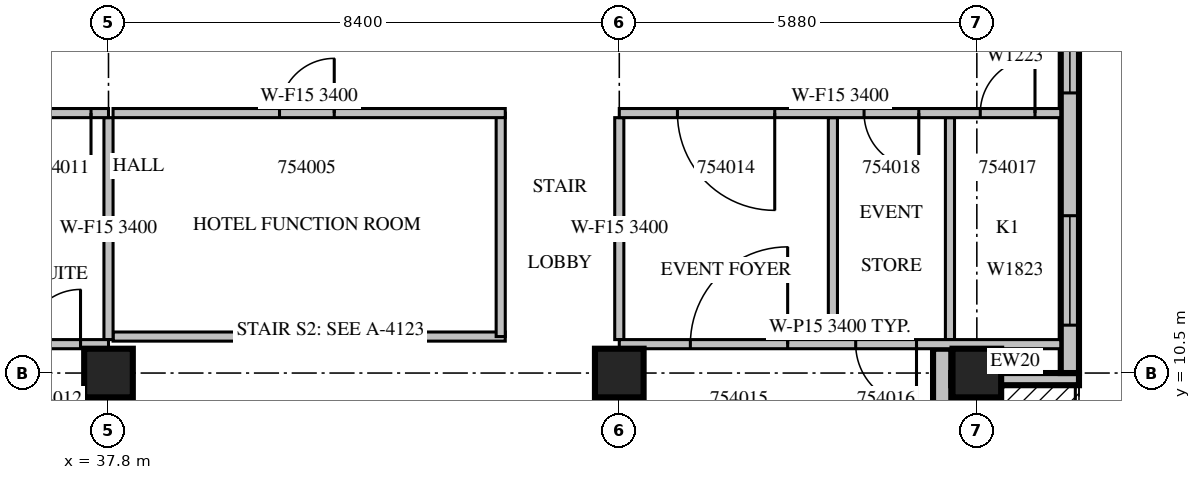
"""IFC4 building model, lengths in metres.
Left out: names, types, materials, properties, quantities, classifications, styles, units other than length and angle.
Written with IfcOpenShell. Run it as: python <this file> out.ifc"""

import sys

from ifc_helpers import new_model, si_unit, direction, frame, frame_2d, origin, origin_2d, place, context, subcontext, project, spatial, rectangle, extrude, source, transform, mapped, element, fill, save


model = new_model("IFC4")
c1 = context("Model", 3, precision=1e-05, world=origin(), true_north=direction((0.0, 1.0)))
c2 = subcontext(c1, "Body", "Model", "MODEL_VIEW")
j1 = project(units=[si_unit("LENGTHUNIT", "METRE"), si_unit("PLANEANGLEUNIT", "RADIAN")], contexts=[c1])
p1 = place(None, origin())
s1 = spatial("IfcSite", under=j1, at=p1, CompositionType="ELEMENT")
p2 = place(p1, origin())
s2 = spatial("IfcBuilding", under=s1, at=p2, CompositionType="ELEMENT")
p3 = place(p2, frame((0.0, 0.0, 238.6)))
s3 = spatial("IfcBuildingStorey", under=s2, at=p3, CompositionType="ELEMENT", Elevation=238.6)
m1 = source(origin(), c2, "Body", "SweptSolid", [
    extrude(rectangle(XDim=0.8, YDim=0.8, at=origin_2d()), origin(), (0.0, 0.0, 1.0), 3.8),
])
for number, where, z_axis, x_axis in (
    (1, (37.8, 10.5, 0.0), (0.0, 0.0, 1.0), (1.0, 0.0, 0.0)),
    (2, (46.2, 10.5, 0.0), (0.0, 0.0, 1.0), (1.0, 0.0, 0.0)),
    (3, (52.08, 10.5, 0.0), (0.0, 0.0, 1.0), (1.0, 0.0, 0.0)),
):
    element("IfcColumn", number, at=place(p3, frame(where, z_axis=z_axis, x_axis=x_axis)), inside=s3, PredefinedType="COLUMN", context=c2, shape_type="MappedRepresentation", body=[
        mapped(m1, transform((0.0, 0.0, 0.0), scale=1.0)),
    ])
m2 = source(origin(), c2, "Body", "SweptSolid", [
    extrude(rectangle(XDim=3.55, YDim=0.3, at=frame_2d((1.775, 0.0))), origin(), (0.0, 0.0, 1.0), 3.4),
])
p4 = place(p3, frame((51.51, 7.35, 0.0), z_axis=(0.0, 0.0, 1.0), x_axis=(0.0, 1.0, 0.0)))
e4 = element("IfcWall", 4, at=p4, inside=s3, PredefinedType="STANDARD", context=c2, shape_type="MappedRepresentation", body=[
    mapped(m2, transform((0.0, 0.0, 0.0), scale=1.0)),
])
m3 = source(origin(), c2, "Body", "SweptSolid", [
    extrude(rectangle(XDim=1.8, YDim=2.4, at=frame_2d((0.9, 1.2))), frame((0.0, 0.16, 0.0), z_axis=(0.0, -1.0, 0.0), x_axis=(1.0, 0.0, 0.0)), (0.0, 0.0, 1.0), 0.32),
])
p5 = place(p4, frame((0.675, 0.0, 0.0)))
e5 = element("IfcOpeningElement", 5, at=p5, cuts=e4, PredefinedType="OPENING", context=c2, shape_type="MappedRepresentation", body=[
    mapped(m3, transform((0.0, 0.0, 0.0), scale=1.0)),
])
m4 = source(origin(), c2, "Body", "SweptSolid", [
    extrude(rectangle(XDim=2.1, YDim=0.2, at=frame_2d((1.05, 0.0))), origin(), (0.0, 0.0, 1.0), 3.4),
])
p6 = place(p3, frame((53.76, 10.4, 0.0), z_axis=(0.0, 0.0, 1.0), x_axis=(-1.0, 0.0, 0.0)))
e6 = element("IfcWall", 6, at=p6, inside=s3, PredefinedType="STANDARD", context=c2, shape_type="MappedRepresentation", body=[
    mapped(m4, transform((0.0, 0.0, 0.0), scale=1.0)),
])
m5 = source(origin(), c2, "Body", "SweptSolid", [
    extrude(rectangle(XDim=6.75, YDim=0.3, at=frame_2d((3.375, 0.0))), origin(), (0.0, 0.0, 1.0), 3.4),
])
p7 = place(p3, frame((53.61, 10.5, 0.0), z_axis=(0.0, 0.0, 1.0), x_axis=(0.0, 1.0, 0.0)))
e7 = element("IfcWall", 7, at=p7, inside=s3, PredefinedType="STANDARD", context=c2, shape_type="MappedRepresentation", body=[
    mapped(m5, transform((0.0, 0.0, 0.0), scale=1.0)),
])
m6 = source(origin(), c2, "Body", "SweptSolid", [
    extrude(rectangle(XDim=1.8, YDim=2.3, at=frame_2d((0.9, 1.15))), frame((0.0, 0.16, 0.0), z_axis=(0.0, -1.0, 0.0), x_axis=(1.0, 0.0, 0.0)), (0.0, 0.0, 1.0), 0.32),
])
p8 = place(p7, frame((0.787, 0.0, 0.6)))
e8 = element("IfcOpeningElement", 8, at=p8, cuts=e7, PredefinedType="OPENING", context=c2, shape_type="MappedRepresentation", body=[
    mapped(m6, transform((0.0, 0.0, 0.0), scale=1.0)),
])
m7 = source(origin(), c2, "Body", "SweptSolid", [
    extrude(rectangle(XDim=1.2, YDim=2.3, at=frame_2d((0.6, 1.15))), frame((0.0, 0.16, 0.0), z_axis=(0.0, -1.0, 0.0), x_axis=(1.0, 0.0, 0.0)), (0.0, 0.0, 1.0), 0.32),
])
p9 = place(p7, frame((4.606, 0.0, 0.6)))
e9 = element("IfcOpeningElement", 9, at=p9, cuts=e7, PredefinedType="OPENING", context=c2, shape_type="MappedRepresentation", body=[
    mapped(m7, transform((0.0, 0.0, 0.0), scale=1.0)),
])
m8 = source(origin(), c2, "Body", "SweptSolid", [
    extrude(rectangle(XDim=6.45, YDim=0.15, at=frame_2d((3.225, 0.0))), origin(), (0.0, 0.0, 1.0), 3.4),
])
p10 = place(p3, frame((37.875, 11.1, 0.0), z_axis=(0.0, 0.0, 1.0), x_axis=(1.0, 0.0, 0.0)))
e10 = element("IfcWall", 10, at=p10, inside=s3, PredefinedType="PARTITIONING", context=c2, shape_type="MappedRepresentation", body=[
    mapped(m8, transform((0.0, 0.0, 0.0), scale=1.0)),
])
p11 = place(p3, frame((44.25, 11.1, 0.0), z_axis=(0.0, 0.0, 1.0), x_axis=(0.0, 1.0, 0.0)))
e11 = element("IfcWall", 11, at=p11, inside=s3, PredefinedType="PARTITIONING", context=c2, shape_type="SweptSolid", body=[
    extrude(rectangle(XDim=3.675, YDim=0.15, at=frame_2d((1.837, 0.0))), origin(), (0.0, 0.0, 1.0), 3.4),
])
p12 = place(p3, frame((44.325, 14.775, 0.0), z_axis=(0.0, 0.0, 1.0), x_axis=(-1.0, 0.0, 0.0)))
e12 = element("IfcWall", 12, at=p12, inside=s3, PredefinedType="PARTITIONING", context=c2, shape_type="MappedRepresentation", body=[
    mapped(m8, transform((0.0, 0.0, 0.0), scale=1.0)),
])
m9 = source(origin(), c2, "Body", "SweptSolid", [
    extrude(rectangle(XDim=0.9, YDim=2.1, at=frame_2d((0.45, 1.05))), frame((0.0, 0.085, 0.0), z_axis=(0.0, -1.0, 0.0), x_axis=(1.0, 0.0, 0.0)), (0.0, 0.0, 1.0), 0.17),
])
p13 = place(p12, frame((2.812, 0.0, 0.0)))
e13 = element("IfcOpeningElement", 13, at=p13, cuts=e12, PredefinedType="OPENING", context=c2, shape_type="MappedRepresentation", body=[
    mapped(m9, transform((0.0, 0.0, 0.0), scale=1.0)),
])
m10 = source(origin(), c2, "Body", "SweptSolid", [
    extrude(rectangle(XDim=9.302, YDim=0.15, at=frame_2d((4.651, 0.0))), origin(), (0.0, 0.0, 1.0), 3.4),
])
p14 = place(p3, frame((37.8, 0.799, 0.0), z_axis=(0.0, 0.0, 1.0), x_axis=(0.0, 1.0, 0.0)))
e14 = element("IfcWall", 14, at=p14, inside=s3, PredefinedType="PARTITIONING", context=c2, shape_type="MappedRepresentation", body=[
    mapped(m10, transform((0.0, 0.0, 0.0), scale=1.0)),
])
m11 = source(origin(), c2, "Body", "SweptSolid", [
    extrude(rectangle(XDim=3.65, YDim=0.15, at=frame_2d((1.825, 0.0))), origin(), (0.0, 0.0, 1.0), 3.4),
])
p15 = place(p3, frame((37.8, 11.05, 0.0), z_axis=(0.0, 0.0, 1.0), x_axis=(0.0, 1.0, 0.0)))
e15 = element("IfcWall", 15, at=p15, inside=s3, PredefinedType="PARTITIONING", context=c2, shape_type="MappedRepresentation", body=[
    mapped(m11, transform((0.0, 0.0, 0.0), scale=1.0)),
])
m12 = source(origin(), c2, "Body", "SweptSolid", [
    extrude(rectangle(XDim=8.4, YDim=0.15, at=frame_2d((4.2, 0.0))), origin(), (0.0, 0.0, 1.0), 2.9),
])
p16 = place(p3, frame((37.8, 10.975, 0.0), z_axis=(0.0, 0.0, 1.0), x_axis=(-1.0, 0.0, 0.0)))
e16 = element("IfcWall", 16, at=p16, inside=s3, PredefinedType="PARTITIONING", context=c2, shape_type="MappedRepresentation", body=[
    mapped(m12, transform((0.0, 0.0, 0.0), scale=1.0)),
])
p17 = place(p16, frame((7.0, 0.0, 0.0)))
e17 = element("IfcOpeningElement", 17, at=p17, cuts=e16, PredefinedType="OPENING", context=c2, shape_type="MappedRepresentation", body=[
    mapped(m9, transform((0.0, 0.0, 0.0), scale=1.0)),
])
p18 = place(p16, frame((5.013, 0.0, 0.0)))
e18 = element("IfcOpeningElement", 18, at=p18, cuts=e16, PredefinedType="OPENING", context=c2, shape_type="MappedRepresentation", body=[
    mapped(m9, transform((0.0, 0.0, 0.0), scale=1.0)),
])
p19 = place(p16, frame((2.388, 0.0, 0.0)))
e19 = element("IfcOpeningElement", 19, at=p19, cuts=e16, PredefinedType="OPENING", context=c2, shape_type="MappedRepresentation", body=[
    mapped(m9, transform((0.0, 0.0, 0.0), scale=1.0)),
])
p20 = place(p16, frame((0.46, 0.0, 0.0)))
e20 = element("IfcOpeningElement", 20, at=p20, cuts=e16, PredefinedType="OPENING", context=c2, shape_type="MappedRepresentation", body=[
    mapped(m9, transform((0.0, 0.0, 0.0), scale=1.0)),
])
for number, where, z_axis, x_axis in (
    (21, (49.713, 11.05, 0.0), (0.0, 0.0, 1.0), (0.0, 1.0, 0.0)),
    (22, (51.638, 11.05, 0.0), (0.0, 0.0, 1.0), (0.0, 1.0, 0.0)),
):
    element("IfcWall", number, at=place(p3, frame(where, z_axis=z_axis, x_axis=x_axis)), inside=s3, PredefinedType="PARTITIONING", context=c2, shape_type="MappedRepresentation", body=[
        mapped(m11, transform((0.0, 0.0, 0.0), scale=1.0)),
    ])
p21 = place(p3, frame((46.2, 0.799, 0.0), z_axis=(0.0, 0.0, 1.0), x_axis=(0.0, 1.0, 0.0)))
e23 = element("IfcWall", 23, at=p21, inside=s3, PredefinedType="PARTITIONING", context=c2, shape_type="MappedRepresentation", body=[
    mapped(m10, transform((0.0, 0.0, 0.0), scale=1.0)),
])
p22 = place(p3, frame((46.2, 11.05, 0.0), z_axis=(0.0, 0.0, 1.0), x_axis=(0.0, 1.0, 0.0)))
e24 = element("IfcWall", 24, at=p22, inside=s3, PredefinedType="PARTITIONING", context=c2, shape_type="MappedRepresentation", body=[
    mapped(m11, transform((0.0, 0.0, 0.0), scale=1.0)),
])
m13 = source(origin(), c2, "Body", "SweptSolid", [
    extrude(rectangle(XDim=7.26, YDim=0.15, at=frame_2d((3.63, 0.0))), origin(), (0.0, 0.0, 1.0), 3.4),
])
p23 = place(p3, frame((53.46, 10.975, 0.0), z_axis=(0.0, 0.0, 1.0), x_axis=(-1.0, 0.0, 0.0)))
e25 = element("IfcWall", 25, at=p23, inside=s3, PredefinedType="PARTITIONING", context=c2, shape_type="MappedRepresentation", body=[
    mapped(m13, transform((0.0, 0.0, 0.0), scale=1.0)),
])
m14 = source(origin(), c2, "Body", "SweptSolid", [
    extrude(rectangle(XDim=1.6, YDim=2.1, at=frame_2d((0.8, 1.05))), frame((0.0, 0.085, 0.0), z_axis=(0.0, -1.0, 0.0), x_axis=(1.0, 0.0, 0.0)), (0.0, 0.0, 1.0), 0.17),
])
p24 = place(p23, frame((4.491, 0.0, 0.0)))
e26 = element("IfcOpeningElement", 26, at=p24, cuts=e25, PredefinedType="OPENING", context=c2, shape_type="MappedRepresentation", body=[
    mapped(m14, transform((0.0, 0.0, 0.0), scale=1.0)),
])
m15 = source(origin(), c2, "Body", "SweptSolid", [
    extrude(rectangle(XDim=1.0, YDim=2.1, at=frame_2d((0.5, 1.05))), frame((0.0, 0.085, 0.0), z_axis=(0.0, -1.0, 0.0), x_axis=(1.0, 0.0, 0.0)), (0.0, 0.0, 1.0), 0.17),
])
p25 = place(p23, frame((2.372, 0.0, 0.0)))
e27 = element("IfcOpeningElement", 27, at=p25, cuts=e25, PredefinedType="OPENING", context=c2, shape_type="MappedRepresentation", body=[
    mapped(m15, transform((0.0, 0.0, 0.0), scale=1.0)),
])
p26 = place(p3, frame((37.8, 14.775, 0.0), z_axis=(0.0, 0.0, 1.0), x_axis=(-1.0, 0.0, 0.0)))
e28 = element("IfcWall", 28, at=p26, inside=s3, PredefinedType="PARTITIONING", context=c2, shape_type="MappedRepresentation", body=[
    mapped(m12, transform((0.0, 0.0, 0.0), scale=1.0)),
])
p27 = place(p26, frame((7.112, 0.0, 0.0)))
e29 = element("IfcOpeningElement", 29, at=p27, cuts=e28, PredefinedType="OPENING", context=c2, shape_type="MappedRepresentation", body=[
    mapped(m15, transform((0.0, 0.0, 0.0), scale=1.0)),
])
p28 = place(p26, frame((0.287, 0.0, 0.0)))
e30 = element("IfcOpeningElement", 30, at=p28, cuts=e28, PredefinedType="OPENING", context=c2, shape_type="MappedRepresentation", body=[
    mapped(m15, transform((0.0, 0.0, 0.0), scale=1.0)),
])
p29 = place(p3, frame((53.46, 14.775, 0.0), z_axis=(0.0, 0.0, 1.0), x_axis=(-1.0, 0.0, 0.0)))
e31 = element("IfcWall", 31, at=p29, inside=s3, PredefinedType="PARTITIONING", context=c2, shape_type="MappedRepresentation", body=[
    mapped(m13, transform((0.0, 0.0, 0.0), scale=1.0)),
])
p30 = place(p29, frame((4.704, 0.0, 0.0)))
e32 = element("IfcOpeningElement", 32, at=p30, cuts=e31, PredefinedType="OPENING", context=c2, shape_type="MappedRepresentation", body=[
    mapped(m14, transform((0.0, 0.0, 0.0), scale=1.0)),
])
p31 = place(p29, frame((0.423, 0.0, 0.0)))
e33 = element("IfcOpeningElement", 33, at=p31, cuts=e31, PredefinedType="OPENING", context=c2, shape_type="MappedRepresentation", body=[
    mapped(m9, transform((0.0, 0.0, 0.0), scale=1.0)),
])
p32 = place(p29, frame((2.335, 0.0, 0.0)))
e34 = element("IfcOpeningElement", 34, at=p32, cuts=e31, PredefinedType="OPENING", context=c2, shape_type="MappedRepresentation", body=[
    mapped(m9, transform((0.0, 0.0, 0.0), scale=1.0)),
])
m16 = source(origin(), c2, "Body", "SweptSolid", [
    extrude(rectangle(XDim=1.8, YDim=2.3, at=frame_2d((0.9, 1.15))), frame((0.0, 0.03, 0.0), z_axis=(0.0, -1.0, 0.0), x_axis=(1.0, 0.0, 0.0)), (0.0, 0.0, 1.0), 0.06),
])
p33 = place(p8, origin())
e35 = element("IfcWindow", 35, at=p33, inside=s3, PartitioningType="SINGLE_PANEL", PredefinedType="WINDOW", context=c2, shape_type="MappedRepresentation", body=[
    mapped(m16, transform((0.0, 0.0, 0.0), scale=1.0)),
])
fill(e8, e35)
m17 = source(origin(), c2, "Body", "SweptSolid", [
    extrude(rectangle(XDim=1.2, YDim=2.3, at=frame_2d((0.6, 1.15))), frame((0.0, 0.03, 0.0), z_axis=(0.0, -1.0, 0.0), x_axis=(1.0, 0.0, 0.0)), (0.0, 0.0, 1.0), 0.06),
])
p34 = place(p9, origin())
e36 = element("IfcWindow", 36, at=p34, inside=s3, PartitioningType="SINGLE_PANEL", PredefinedType="WINDOW", context=c2, shape_type="MappedRepresentation", body=[
    mapped(m17, transform((0.0, 0.0, 0.0), scale=1.0)),
])
fill(e9, e36)
m18 = source(origin(), c2, "Body", "SweptSolid", [
    extrude(rectangle(XDim=0.9, YDim=2.1, at=frame_2d((0.45, 1.05))), frame((0.0, 0.025, 0.0), z_axis=(0.0, -1.0, 0.0), x_axis=(1.0, 0.0, 0.0)), (0.0, 0.0, 1.0), 0.05),
])
p35 = place(p13, origin())
e37 = element("IfcDoor", 37, at=p35, inside=s3, OperationType="SINGLE_SWING_RIGHT", PredefinedType="DOOR", context=c2, shape_type="MappedRepresentation", body=[
    mapped(m18, transform((0.0, 0.0, 0.0), scale=1.0)),
])
fill(e13, e37)
m19 = source(origin(), c2, "Body", "SweptSolid", [
    extrude(rectangle(XDim=1.0, YDim=2.1, at=frame_2d((0.5, 1.05))), frame((0.0, 0.025, 0.0), z_axis=(0.0, -1.0, 0.0), x_axis=(1.0, 0.0, 0.0)), (0.0, 0.0, 1.0), 0.05),
])
p36 = place(p28, origin())
e38 = element("IfcDoor", 38, at=p36, inside=s3, OperationType="SINGLE_SWING_LEFT", PredefinedType="DOOR", context=c2, shape_type="MappedRepresentation", body=[
    mapped(m19, transform((0.0, 0.0, 0.0), scale=1.0)),
])
fill(e30, e38)
p37 = place(p20, origin())
e39 = element("IfcDoor", 39, at=p37, inside=s3, OperationType="SINGLE_SWING_RIGHT", PredefinedType="DOOR", context=c2, shape_type="MappedRepresentation", body=[
    mapped(m18, transform((0.0, 0.0, 0.0), scale=1.0)),
])
fill(e20, e39)
m20 = source(origin(), c2, "Body", "SweptSolid", [
    extrude(rectangle(XDim=1.6, YDim=2.1, at=frame_2d((0.8, 1.05))), frame((0.0, 0.025, 0.0), z_axis=(0.0, -1.0, 0.0), x_axis=(1.0, 0.0, 0.0)), (0.0, 0.0, 1.0), 0.05),
])
p38 = place(p30, origin())
e40 = element("IfcDoor", 40, at=p38, inside=s3, OperationType="SINGLE_SWING_LEFT", PredefinedType="DOOR", context=c2, shape_type="MappedRepresentation", body=[
    mapped(m20, transform((0.0, 0.0, 0.0), scale=1.0)),
])
fill(e32, e40)
p39 = place(p24, origin())
e41 = element("IfcDoor", 41, at=p39, inside=s3, OperationType="SINGLE_SWING_RIGHT", PredefinedType="DOOR", context=c2, shape_type="MappedRepresentation", body=[
    mapped(m20, transform((0.0, 0.0, 0.0), scale=1.0)),
])
fill(e26, e41)
p40 = place(p25, origin())
e42 = element("IfcDoor", 42, at=p40, inside=s3, OperationType="SINGLE_SWING_LEFT", PredefinedType="DOOR", context=c2, shape_type="MappedRepresentation", body=[
    mapped(m19, transform((0.0, 0.0, 0.0), scale=1.0)),
])
fill(e27, e42)
p41 = place(p31, origin())
e43 = element("IfcDoor", 43, at=p41, inside=s3, OperationType="SINGLE_SWING_RIGHT", PredefinedType="DOOR", context=c2, shape_type="MappedRepresentation", body=[
    mapped(m18, transform((0.0, 0.0, 0.0), scale=1.0)),
])
fill(e33, e43)
p42 = place(p32, origin())
e44 = element("IfcDoor", 44, at=p42, inside=s3, OperationType="SINGLE_SWING_LEFT", PredefinedType="DOOR", context=c2, shape_type="MappedRepresentation", body=[
    mapped(m18, transform((0.0, 0.0, 0.0), scale=1.0)),
])
fill(e34, e44)
save(model, sys.argv[1])
